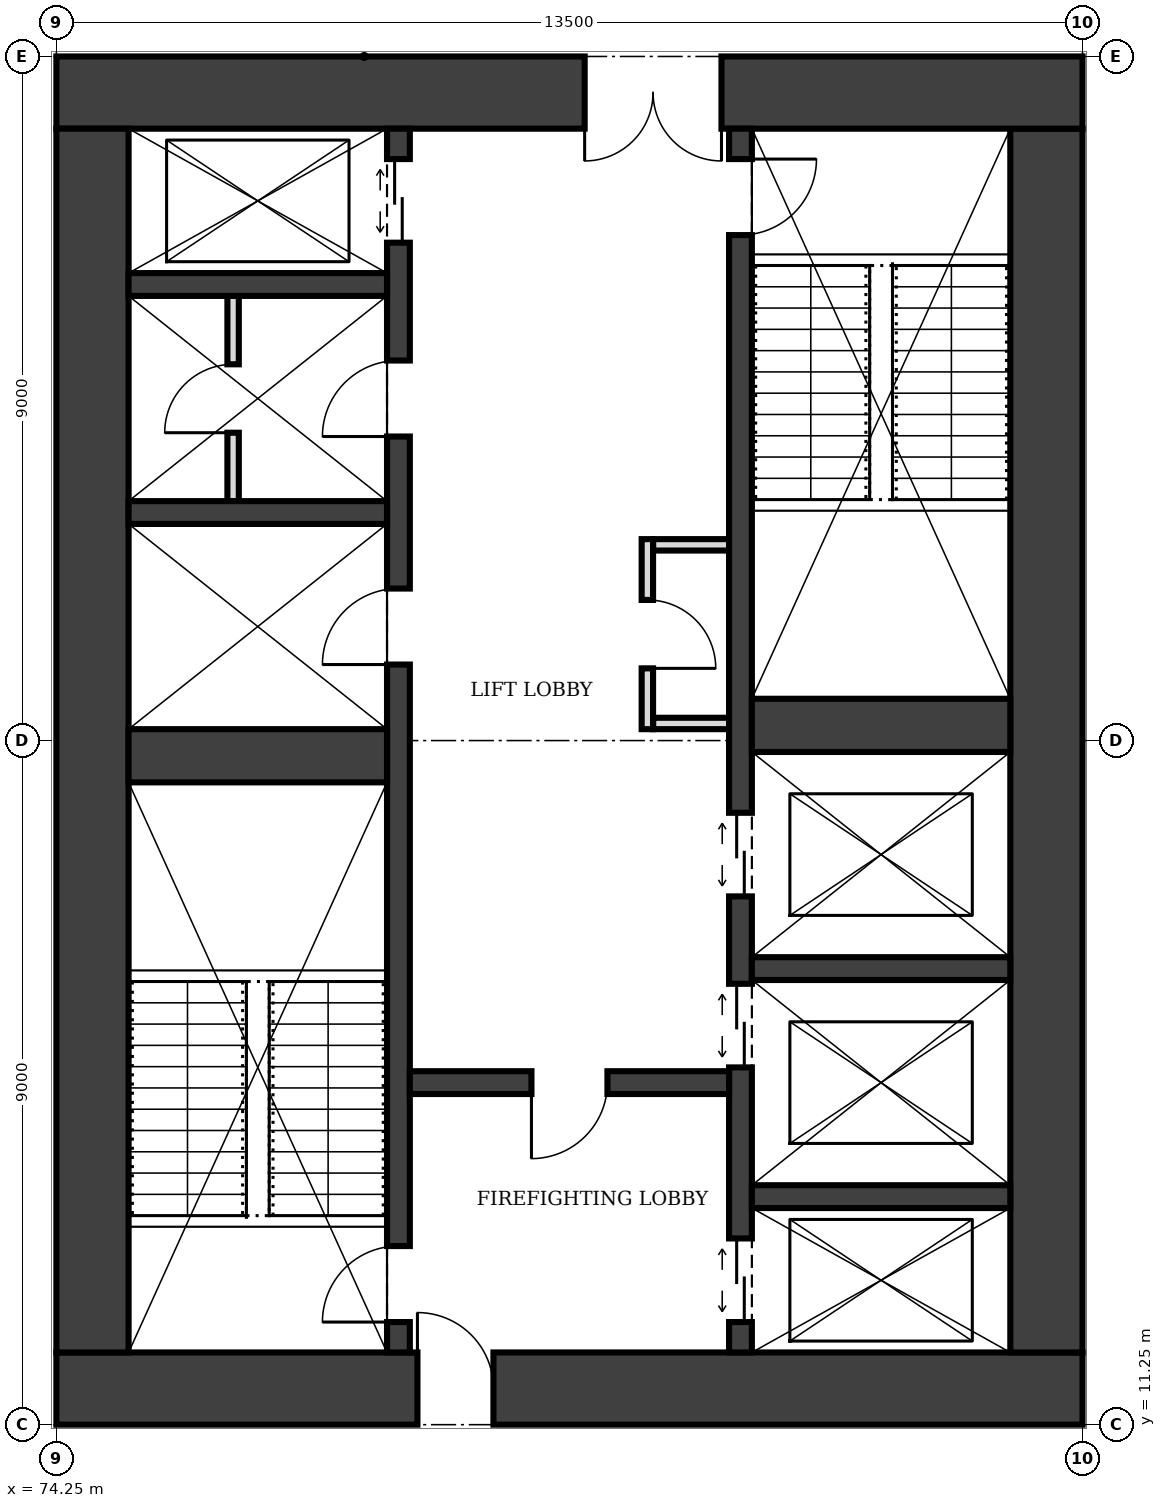
"""IFC4 building model, lengths in metres.
Left out: names, types, materials, properties, quantities, classifications, styles, units other than length and angle.
Written with IfcOpenShell. Run it as: python <this file> out.ifc"""

import sys

from ifc_helpers import new_model, si_unit, direction, frame, frame_2d, origin, place, context, subcontext, project, spatial, rectangle, extrude, element, fill, save


model = new_model("IFC4")
c1 = context("Model", 3, precision=1e-05, world=origin(), true_north=direction((0.0, 1.0)))
c2 = subcontext(c1, "Body", "Model", "MODEL_VIEW")
j1 = project(units=[si_unit("LENGTHUNIT", "METRE"), si_unit("PLANEANGLEUNIT", "RADIAN")], contexts=[c1])
p1 = place(None, origin())
s1 = spatial("IfcSite", under=j1, at=p1, CompositionType="ELEMENT")
p2 = place(p1, origin())
s2 = spatial("IfcBuilding", under=s1, at=p2, CompositionType="ELEMENT")
p3 = place(p2, frame((0.0, 0.0, 225.0)))
s3 = spatial("IfcBuildingStorey", under=s2, at=p3, CompositionType="ELEMENT", Elevation=225.0)
p4 = place(p3, frame((74.25, 11.725, 0.0), z_axis=(0.0, 0.0, 1.0), x_axis=(1.0, 0.0, 0.0)))
e1 = element("IfcWall", 1, at=p4, inside=s3, PredefinedType="SHEAR", context=c2, shape_type="SweptSolid", body=[
    extrude(rectangle(XDim=13.5, YDim=0.95, at=frame_2d((6.75, 0.0))), origin(), (0.0, 0.0, 1.0), 4.0),
])
p5 = place(p4, frame((4.75, 0.0, 0.0)))
e2 = element("IfcOpeningElement", 2, at=p5, cuts=e1, PredefinedType="OPENING", context=c2, shape_type="SweptSolid", body=[
    extrude(rectangle(XDim=1.0, YDim=2.1, at=frame_2d((0.5, 1.05))), frame((0.0, 0.485, 0.0), z_axis=(0.0, -1.0, 0.0), x_axis=(1.0, 0.0, 0.0)), (0.0, 0.0, 1.0), 0.97),
])
p6 = place(p3, frame((87.275, 12.2, 0.0), z_axis=(0.0, 0.0, 1.0), x_axis=(0.0, 1.0, 0.0)))
e3 = element("IfcWall", 3, at=p6, inside=s3, PredefinedType="SHEAR", context=c2, shape_type="SweptSolid", body=[
    extrude(rectangle(XDim=16.1, YDim=0.95, at=frame_2d((8.05, 0.0))), origin(), (0.0, 0.0, 1.0), 4.0),
])
p7 = place(p3, frame((87.75, 28.775, 0.0), z_axis=(0.0, 0.0, 1.0), x_axis=(-1.0, 0.0, 0.0)))
e4 = element("IfcWall", 4, at=p7, inside=s3, PredefinedType="SHEAR", context=c2, shape_type="SweptSolid", body=[
    extrude(rectangle(XDim=13.5, YDim=0.95, at=frame_2d((6.75, 0.0))), origin(), (0.0, 0.0, 1.0), 4.0),
])
p8 = place(p7, frame((4.75, 0.0, 0.0)))
e5 = element("IfcOpeningElement", 5, at=p8, cuts=e4, PredefinedType="OPENING", context=c2, shape_type="SweptSolid", body=[
    extrude(rectangle(XDim=1.8, YDim=2.1, at=frame_2d((0.9, 1.05))), frame((0.0, 0.485, 0.0), z_axis=(0.0, -1.0, 0.0), x_axis=(1.0, 0.0, 0.0)), (0.0, 0.0, 1.0), 0.97),
])
p9 = place(p3, frame((74.725, 28.3, 0.0), z_axis=(0.0, 0.0, 1.0), x_axis=(0.0, -1.0, 0.0)))
e6 = element("IfcWall", 6, at=p9, inside=s3, PredefinedType="SHEAR", context=c2, shape_type="SweptSolid", body=[
    extrude(rectangle(XDim=16.1, YDim=0.95, at=frame_2d((8.05, 0.0))), origin(), (0.0, 0.0, 1.0), 4.0),
])
p10 = place(p3, frame((78.75, 12.2, 0.0), z_axis=(0.0, 0.0, 1.0), x_axis=(0.0, 1.0, 0.0)))
e7 = element("IfcWall", 7, at=p10, inside=s3, PredefinedType="SHEAR", context=c2, shape_type="SweptSolid", body=[
    extrude(rectangle(XDim=16.1, YDim=0.3, at=frame_2d((8.05, 0.0))), origin(), (0.0, 0.0, 1.0), 4.0),
])
p11 = place(p10, frame((0.4, 0.0, 0.0)))
e8 = element("IfcOpeningElement", 8, at=p11, cuts=e7, PredefinedType="OPENING", context=c2, shape_type="SweptSolid", body=[
    extrude(rectangle(XDim=1.0, YDim=2.1, at=frame_2d((0.5, 1.05))), frame((0.0, 0.16, 0.0), z_axis=(0.0, -1.0, 0.0), x_axis=(1.0, 0.0, 0.0)), (0.0, 0.0, 1.0), 0.32),
])
p12 = place(p10, frame((14.6, 0.0, 0.0)))
e9 = element("IfcOpeningElement", 9, at=p12, cuts=e7, PredefinedType="OPENING", context=c2, shape_type="SweptSolid", body=[
    extrude(rectangle(XDim=1.1, YDim=2.1, at=frame_2d((0.55, 1.05))), frame((0.0, 0.16, 0.0), z_axis=(0.0, -1.0, 0.0), x_axis=(1.0, 0.0, 0.0)), (0.0, 0.0, 1.0), 0.32),
])
p13 = place(p10, frame((9.05, 0.0, 0.0)))
e10 = element("IfcOpeningElement", 10, at=p13, cuts=e7, PredefinedType="OPENING", context=c2, shape_type="SweptSolid", body=[
    extrude(rectangle(XDim=1.0, YDim=2.1, at=frame_2d((0.5, 1.05))), frame((0.0, 0.16, 0.0), z_axis=(0.0, -1.0, 0.0), x_axis=(1.0, 0.0, 0.0)), (0.0, 0.0, 1.0), 0.32),
])
p14 = place(p10, frame((12.05, 0.0, 0.0)))
e11 = element("IfcOpeningElement", 11, at=p14, cuts=e7, PredefinedType="OPENING", context=c2, shape_type="SweptSolid", body=[
    extrude(rectangle(XDim=1.0, YDim=2.1, at=frame_2d((0.5, 1.05))), frame((0.0, 0.16, 0.0), z_axis=(0.0, -1.0, 0.0), x_axis=(1.0, 0.0, 0.0)), (0.0, 0.0, 1.0), 0.32),
])
p15 = place(p3, frame((83.25, 12.2, 0.0), z_axis=(0.0, 0.0, 1.0), x_axis=(0.0, 1.0, 0.0)))
e12 = element("IfcWall", 12, at=p15, inside=s3, PredefinedType="SHEAR", context=c2, shape_type="SweptSolid", body=[
    extrude(rectangle(XDim=16.1, YDim=0.3, at=frame_2d((8.05, 0.0))), origin(), (0.0, 0.0, 1.0), 4.0),
])
p16 = place(p15, frame((14.7, 0.0, 0.0)))
e13 = element("IfcOpeningElement", 13, at=p16, cuts=e12, PredefinedType="OPENING", context=c2, shape_type="SweptSolid", body=[
    extrude(rectangle(XDim=1.0, YDim=2.1, at=frame_2d((0.5, 1.05))), frame((0.0, 0.16, 0.0), z_axis=(0.0, -1.0, 0.0), x_axis=(1.0, 0.0, 0.0)), (0.0, 0.0, 1.0), 0.32),
])
p17 = place(p15, frame((0.4, 0.0, 0.0)))
e14 = element("IfcOpeningElement", 14, at=p17, cuts=e12, PredefinedType="OPENING", context=c2, shape_type="SweptSolid", body=[
    extrude(rectangle(XDim=1.1, YDim=2.1, at=frame_2d((0.55, 1.05))), frame((0.0, 0.16, 0.0), z_axis=(0.0, -1.0, 0.0), x_axis=(1.0, 0.0, 0.0)), (0.0, 0.0, 1.0), 0.32),
])
p18 = place(p15, frame((3.75, 0.0, 0.0)))
e15 = element("IfcOpeningElement", 15, at=p18, cuts=e12, PredefinedType="OPENING", context=c2, shape_type="SweptSolid", body=[
    extrude(rectangle(XDim=1.1, YDim=2.1, at=frame_2d((0.55, 1.05))), frame((0.0, 0.16, 0.0), z_axis=(0.0, -1.0, 0.0), x_axis=(1.0, 0.0, 0.0)), (0.0, 0.0, 1.0), 0.32),
])
p19 = place(p15, frame((6.0, 0.0, 0.0)))
e16 = element("IfcOpeningElement", 16, at=p19, cuts=e12, PredefinedType="OPENING", context=c2, shape_type="SweptSolid", body=[
    extrude(rectangle(XDim=1.1, YDim=2.1, at=frame_2d((0.55, 1.05))), frame((0.0, 0.16, 0.0), z_axis=(0.0, -1.0, 0.0), x_axis=(1.0, 0.0, 0.0)), (0.0, 0.0, 1.0), 0.32),
])
p20 = place(p3, frame((75.2, 20.05, 0.0), z_axis=(0.0, 0.0, 1.0), x_axis=(1.0, 0.0, 0.0)))
e17 = element("IfcWall", 17, at=p20, inside=s3, PredefinedType="SHEAR", context=c2, shape_type="SweptSolid", body=[
    extrude(rectangle(XDim=3.4, YDim=0.7, at=frame_2d((1.7, 0.0))), origin(), (0.0, 0.0, 1.0), 4.0),
])
p21 = place(p3, frame((78.9, 15.75, 0.0), z_axis=(0.0, 0.0, 1.0), x_axis=(1.0, 0.0, 0.0)))
e18 = element("IfcWall", 18, at=p21, inside=s3, PredefinedType="SHEAR", context=c2, shape_type="SweptSolid", body=[
    extrude(rectangle(XDim=4.2, YDim=0.3, at=frame_2d((2.1, 0.0))), origin(), (0.0, 0.0, 1.0), 4.0),
])
p22 = place(p21, frame((1.6, 0.0, 0.0)))
e19 = element("IfcOpeningElement", 19, at=p22, cuts=e18, PredefinedType="OPENING", context=c2, shape_type="SweptSolid", body=[
    extrude(rectangle(XDim=1.0, YDim=2.1, at=frame_2d((0.5, 1.05))), frame((0.0, 0.16, 0.0), z_axis=(0.0, -1.0, 0.0), x_axis=(1.0, 0.0, 0.0)), (0.0, 0.0, 1.0), 0.32),
])
for number, where, z_axis, x_axis in (
    (20, (83.4, 14.25, 0.0), (0.0, 0.0, 1.0), (1.0, 0.0, 0.0)),
    (21, (83.4, 17.25, 0.0), (0.0, 0.0, 1.0), (1.0, 0.0, 0.0)),
):
    element("IfcWall", number, at=place(p3, frame(where, z_axis=z_axis, x_axis=x_axis)), inside=s3, PredefinedType="SHEAR", context=c2, shape_type="SweptSolid", body=[
        extrude(rectangle(XDim=3.4, YDim=0.3, at=frame_2d((1.7, 0.0))), origin(), (0.0, 0.0, 1.0), 4.0),
    ])
p23 = place(p3, frame((83.4, 20.45, 0.0), z_axis=(0.0, 0.0, 1.0), x_axis=(1.0, 0.0, 0.0)))
e22 = element("IfcWall", 22, at=p23, inside=s3, PredefinedType="SHEAR", context=c2, shape_type="SweptSolid", body=[
    extrude(rectangle(XDim=3.4, YDim=0.7, at=frame_2d((1.7, 0.0))), origin(), (0.0, 0.0, 1.0), 4.0),
])
for number, where, z_axis, x_axis in (
    (23, (75.2, 23.25, 0.0), (0.0, 0.0, 1.0), (1.0, 0.0, 0.0)),
    (24, (75.2, 26.25, 0.0), (0.0, 0.0, 1.0), (1.0, 0.0, 0.0)),
):
    element("IfcWall", number, at=place(p3, frame(where, z_axis=z_axis, x_axis=x_axis)), inside=s3, PredefinedType="SHEAR", context=c2, shape_type="SweptSolid", body=[
        extrude(rectangle(XDim=3.4, YDim=0.3, at=frame_2d((1.7, 0.0))), origin(), (0.0, 0.0, 1.0), 4.0),
    ])
p24 = place(p3, frame((82.025, 20.4, 0.0), z_axis=(0.0, 0.0, 1.0), x_axis=(0.0, 1.0, 0.0)))
e25 = element("IfcWall", 25, at=p24, inside=s3, PredefinedType="PARTITIONING", context=c2, shape_type="SweptSolid", body=[
    extrude(rectangle(XDim=2.5, YDim=0.15, at=frame_2d((1.25, 0.0))), origin(), (0.0, 0.0, 1.0), 3.75),
])
p25 = place(p24, frame((0.8, 0.0, 0.0)))
e26 = element("IfcOpeningElement", 26, at=p25, cuts=e25, PredefinedType="OPENING", context=c2, shape_type="SweptSolid", body=[
    extrude(rectangle(XDim=0.9, YDim=2.1, at=frame_2d((0.45, 1.05))), frame((0.0, 0.085, 0.0), z_axis=(0.0, -1.0, 0.0), x_axis=(1.0, 0.0, 0.0)), (0.0, 0.0, 1.0), 0.17),
])
for number, where, z_axis, x_axis in (
    (27, (82.1, 20.475, 0.0), (0.0, 0.0, 1.0), (1.0, 0.0, 0.0)),
    (28, (82.1, 22.825, 0.0), (0.0, 0.0, 1.0), (1.0, 0.0, 0.0)),
):
    element("IfcWall", number, at=place(p3, frame(where, z_axis=z_axis, x_axis=x_axis)), inside=s3, PredefinedType="PARTITIONING", context=c2, shape_type="SweptSolid", body=[
        extrude(rectangle(XDim=1.0, YDim=0.15, at=frame_2d((0.5, 0.0))), origin(), (0.0, 0.0, 1.0), 3.75),
    ])
p26 = place(p3, frame((76.575, 23.4, 0.0), z_axis=(0.0, 0.0, 1.0), x_axis=(0.0, 1.0, 0.0)))
e29 = element("IfcWall", 29, at=p26, inside=s3, PredefinedType="PARTITIONING", context=c2, shape_type="SweptSolid", body=[
    extrude(rectangle(XDim=2.7, YDim=0.15, at=frame_2d((1.35, 0.0))), origin(), (0.0, 0.0, 1.0), 3.75),
])
p27 = place(p26, frame((0.9, 0.0, 0.0)))
e30 = element("IfcOpeningElement", 30, at=p27, cuts=e29, PredefinedType="OPENING", context=c2, shape_type="SweptSolid", body=[
    extrude(rectangle(XDim=0.9, YDim=2.1, at=frame_2d((0.45, 1.05))), frame((0.0, 0.085, 0.0), z_axis=(0.0, -1.0, 0.0), x_axis=(1.0, 0.0, 0.0)), (0.0, 0.0, 1.0), 0.17),
])
p28 = place(p5, origin())
e31 = element("IfcDoor", 31, at=p28, inside=s3, OperationType="SINGLE_SWING_LEFT", PredefinedType="DOOR", context=c2, shape_type="SweptSolid", body=[
    extrude(rectangle(XDim=1.0, YDim=2.1, at=frame_2d((0.5, 1.05))), frame((0.0, 0.025, 0.0), z_axis=(0.0, -1.0, 0.0), x_axis=(1.0, 0.0, 0.0)), (0.0, 0.0, 1.0), 0.05),
])
fill(e2, e31)
p29 = place(p8, origin())
e32 = element("IfcDoor", 32, at=p29, inside=s3, OperationType="DOUBLE_DOOR_SINGLE_SWING", PredefinedType="DOOR", context=c2, shape_type="SweptSolid", body=[
    extrude(rectangle(XDim=1.8, YDim=2.1, at=frame_2d((0.9, 1.05))), frame((0.0, 0.025, 0.0), z_axis=(0.0, -1.0, 0.0), x_axis=(1.0, 0.0, 0.0)), (0.0, 0.0, 1.0), 0.05),
])
fill(e5, e32)
p30 = place(p22, frame((1.0, 0.0, 0.0), z_axis=(0.0, 0.0, 1.0), x_axis=(-1.0, 0.0, 0.0)))
e33 = element("IfcDoor", 33, at=p30, inside=s3, OperationType="SINGLE_SWING_RIGHT", PredefinedType="DOOR", context=c2, shape_type="SweptSolid", body=[
    extrude(rectangle(XDim=1.0, YDim=2.1, at=frame_2d((0.5, 1.05))), frame((0.0, 0.025, 0.0), z_axis=(0.0, -1.0, 0.0), x_axis=(1.0, 0.0, 0.0)), (0.0, 0.0, 1.0), 0.05),
])
fill(e19, e33)
p31 = place(p11, origin())
e34 = element("IfcDoor", 34, at=p31, inside=s3, OperationType="SINGLE_SWING_LEFT", PredefinedType="DOOR", context=c2, shape_type="SweptSolid", body=[
    extrude(rectangle(XDim=1.0, YDim=2.1, at=frame_2d((0.5, 1.05))), frame((0.0, 0.025, 0.0), z_axis=(0.0, -1.0, 0.0), x_axis=(1.0, 0.0, 0.0)), (0.0, 0.0, 1.0), 0.05),
])
fill(e8, e34)
p32 = place(p16, frame((1.0, 0.0, 0.0), z_axis=(0.0, 0.0, 1.0), x_axis=(-1.0, 0.0, 0.0)))
e35 = element("IfcDoor", 35, at=p32, inside=s3, OperationType="SINGLE_SWING_LEFT", PredefinedType="DOOR", context=c2, shape_type="SweptSolid", body=[
    extrude(rectangle(XDim=1.0, YDim=2.1, at=frame_2d((0.5, 1.05))), frame((0.0, 0.025, 0.0), z_axis=(0.0, -1.0, 0.0), x_axis=(1.0, 0.0, 0.0)), (0.0, 0.0, 1.0), 0.05),
])
fill(e13, e35)
p33 = place(p17, origin())
e36 = element("IfcDoor", 36, at=p33, inside=s3, OperationType="DOUBLE_DOOR_SLIDING", PredefinedType="DOOR", context=c2, shape_type="SweptSolid", body=[
    extrude(rectangle(XDim=1.1, YDim=2.1, at=frame_2d((0.55, 1.05))), frame((0.0, 0.025, 0.0), z_axis=(0.0, -1.0, 0.0), x_axis=(1.0, 0.0, 0.0)), (0.0, 0.0, 1.0), 0.05),
])
fill(e14, e36)
p34 = place(p12, origin())
e37 = element("IfcDoor", 37, at=p34, inside=s3, OperationType="DOUBLE_DOOR_SLIDING", PredefinedType="DOOR", context=c2, shape_type="SweptSolid", body=[
    extrude(rectangle(XDim=1.1, YDim=2.1, at=frame_2d((0.55, 1.05))), frame((0.0, 0.025, 0.0), z_axis=(0.0, -1.0, 0.0), x_axis=(1.0, 0.0, 0.0)), (0.0, 0.0, 1.0), 0.05),
])
fill(e9, e37)
p35 = place(p18, origin())
e38 = element("IfcDoor", 38, at=p35, inside=s3, OperationType="DOUBLE_DOOR_SLIDING", PredefinedType="DOOR", context=c2, shape_type="SweptSolid", body=[
    extrude(rectangle(XDim=1.1, YDim=2.1, at=frame_2d((0.55, 1.05))), frame((0.0, 0.025, 0.0), z_axis=(0.0, -1.0, 0.0), x_axis=(1.0, 0.0, 0.0)), (0.0, 0.0, 1.0), 0.05),
])
fill(e15, e38)
p36 = place(p19, origin())
e39 = element("IfcDoor", 39, at=p36, inside=s3, OperationType="DOUBLE_DOOR_SLIDING", PredefinedType="DOOR", context=c2, shape_type="SweptSolid", body=[
    extrude(rectangle(XDim=1.1, YDim=2.1, at=frame_2d((0.55, 1.05))), frame((0.0, 0.025, 0.0), z_axis=(0.0, -1.0, 0.0), x_axis=(1.0, 0.0, 0.0)), (0.0, 0.0, 1.0), 0.05),
])
fill(e16, e39)
p37 = place(p25, frame((0.9, 0.0, 0.0), z_axis=(0.0, 0.0, 1.0), x_axis=(-1.0, 0.0, 0.0)))
e40 = element("IfcDoor", 40, at=p37, inside=s3, OperationType="SINGLE_SWING_RIGHT", PredefinedType="DOOR", context=c2, shape_type="SweptSolid", body=[
    extrude(rectangle(XDim=0.9, YDim=2.1, at=frame_2d((0.45, 1.05))), frame((0.0, 0.025, 0.0), z_axis=(0.0, -1.0, 0.0), x_axis=(1.0, 0.0, 0.0)), (0.0, 0.0, 1.0), 0.05),
])
fill(e26, e40)
p38 = place(p13, origin())
e41 = element("IfcDoor", 41, at=p38, inside=s3, OperationType="SINGLE_SWING_LEFT", PredefinedType="DOOR", context=c2, shape_type="SweptSolid", body=[
    extrude(rectangle(XDim=1.0, YDim=2.1, at=frame_2d((0.5, 1.05))), frame((0.0, 0.025, 0.0), z_axis=(0.0, -1.0, 0.0), x_axis=(1.0, 0.0, 0.0)), (0.0, 0.0, 1.0), 0.05),
])
fill(e10, e41)
p39 = place(p14, origin())
e42 = element("IfcDoor", 42, at=p39, inside=s3, OperationType="SINGLE_SWING_LEFT", PredefinedType="DOOR", context=c2, shape_type="SweptSolid", body=[
    extrude(rectangle(XDim=1.0, YDim=2.1, at=frame_2d((0.5, 1.05))), frame((0.0, 0.025, 0.0), z_axis=(0.0, -1.0, 0.0), x_axis=(1.0, 0.0, 0.0)), (0.0, 0.0, 1.0), 0.05),
])
fill(e11, e42)
p40 = place(p27, origin())
e43 = element("IfcDoor", 43, at=p40, inside=s3, OperationType="SINGLE_SWING_LEFT", PredefinedType="DOOR", context=c2, shape_type="SweptSolid", body=[
    extrude(rectangle(XDim=0.9, YDim=2.1, at=frame_2d((0.45, 1.05))), frame((0.0, 0.025, 0.0), z_axis=(0.0, -1.0, 0.0), x_axis=(1.0, 0.0, 0.0)), (0.0, 0.0, 1.0), 0.05),
])
fill(e30, e43)
save(model, sys.argv[1])
